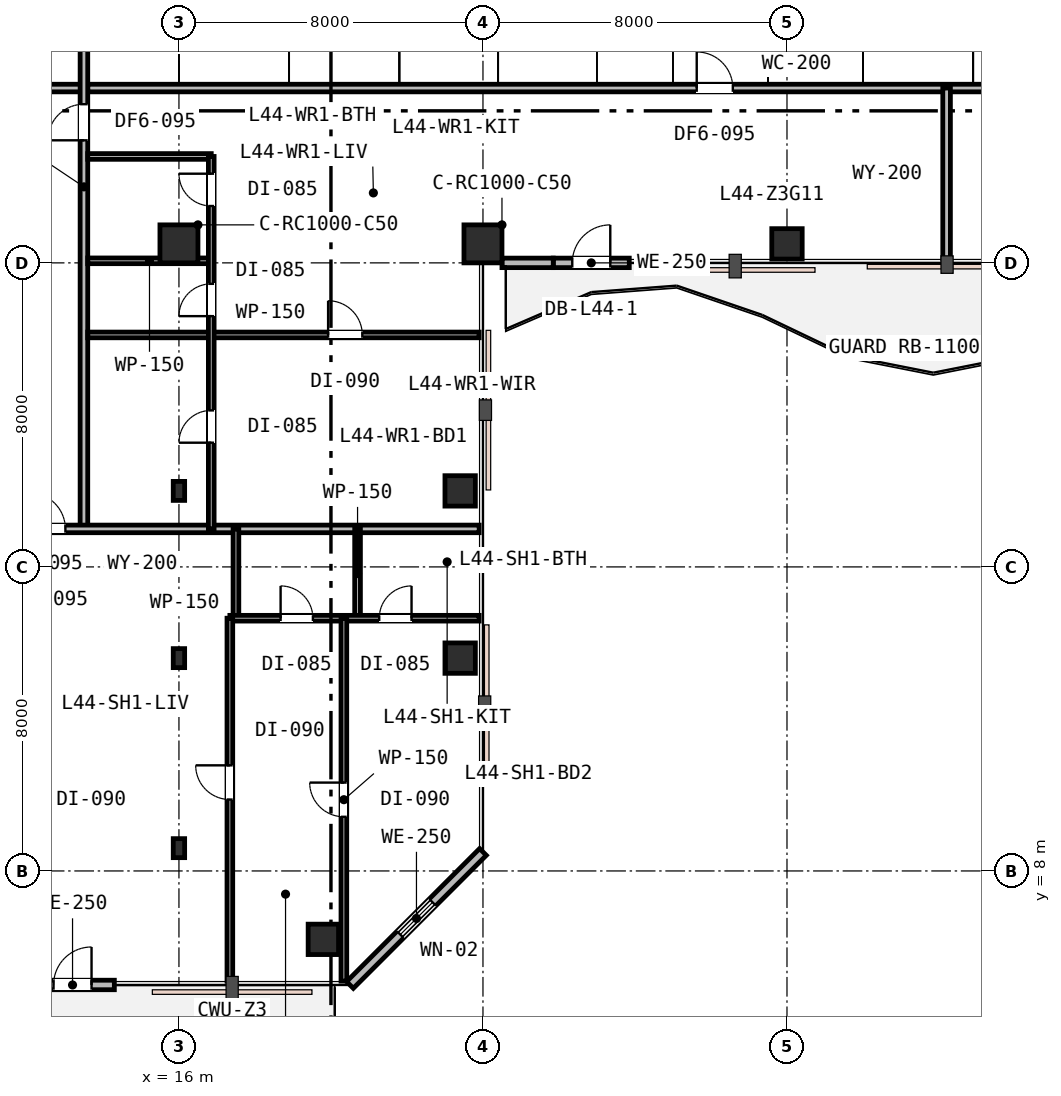
"""IFC4 building model, lengths in metres.
Left out: names, types, materials, properties, quantities, classifications, styles, units other than length and angle.
Written with IfcOpenShell. Run it as: python <this file> out.ifc"""

import sys

from ifc_helpers import new_model, si_unit, direction, frame, frame_2d, origin, origin_2d, place, context, subcontext, project, spatial, rectangle, i_section, extrude, element, fill, save


model = new_model("IFC4")
c1 = context("Model", 3, precision=1e-05, world=origin(), true_north=direction((0.0, 1.0)))
c2 = subcontext(c1, "Body", "Model", "MODEL_VIEW")
j1 = project(units=[si_unit("LENGTHUNIT", "METRE"), si_unit("PLANEANGLEUNIT", "RADIAN")], contexts=[c1])
p1 = place(None, origin())
s1 = spatial("IfcSite", under=j1, at=p1, CompositionType="ELEMENT")
p2 = place(p1, origin())
s2 = spatial("IfcBuilding", under=s1, at=p2, CompositionType="ELEMENT")
p3 = place(p2, frame((0.0, 0.0, 172.2)))
s3 = spatial("IfcBuildingStorey", under=s2, at=p3, CompositionType="ELEMENT", Elevation=172.2)
for number, where, z_axis, x_axis in (
    (1, (16.0, 24.5, 0.0), (0.0, 0.0, 1.0), (1.0, 0.0, 0.0)),
    (2, (24.0, 24.5, 0.0), (0.0, 0.0, 1.0), (1.0, 0.0, 0.0)),
):
    element("IfcColumn", number, at=place(p3, frame(where, z_axis=z_axis, x_axis=x_axis)), inside=s3, PredefinedType="COLUMN", context=c2, shape_type="SweptSolid", body=[
        extrude(rectangle(XDim=1.0, YDim=1.0, at=origin_2d()), origin(), (0.0, 0.0, 1.0), 3.6),
    ])
for number, where, z_axis, x_axis in (
    (3, (32.0, 24.5, 0.0), (0.0, 0.0, 1.0), (1.0, 0.0, 0.0)),
    (4, (19.8, 6.2, 0.0), (0.0, 0.0, 1.0), (1.0, 0.0, 0.0)),
    (5, (23.4, 13.6, 0.0), (0.0, 0.0, 1.0), (1.0, 0.0, 0.0)),
    (6, (23.4, 18.0, 0.0), (0.0, 0.0, 1.0), (1.0, 0.0, 0.0)),
):
    element("IfcColumn", number, at=place(p3, frame(where, z_axis=z_axis, x_axis=x_axis)), inside=s3, PredefinedType="COLUMN", context=c2, shape_type="SweptSolid", body=[
        extrude(rectangle(XDim=0.8, YDim=0.8, at=origin_2d()), origin(), (0.0, 0.0, 1.0), 3.6),
    ])
for number, where, z_axis, x_axis in (
    (7, (16.0, 8.6, 0.0), (0.0, 0.0, 1.0), (1.0, 0.0, 0.0)),
    (8, (16.0, 13.6, 0.0), (0.0, 0.0, 1.0), (1.0, 0.0, 0.0)),
    (9, (16.0, 18.0, 0.0), (0.0, 0.0, 1.0), (1.0, 0.0, 0.0)),
):
    element("IfcColumn", number, at=place(p3, frame(where, z_axis=z_axis, x_axis=x_axis)), inside=s3, PredefinedType="COLUMN", context=c2, shape_type="SweptSolid", body=[
        extrude(i_section(OverallWidth=0.3, OverallDepth=0.5, WebThickness=0.015, FlangeThickness=0.028, FilletRadius=0.027, at=origin_2d()), origin(), (0.0, 0.0, 1.0), 3.6),
    ])
p4 = place(p3, frame((12.1, 5.0, 0.0), z_axis=(0.0, 0.0, 1.0), x_axis=(1.0, 0.0, 0.0)))
e10 = element("IfcWall", 10, at=p4, inside=s3, PredefinedType="STANDARD", context=c2, shape_type="SweptSolid", body=[
    extrude(rectangle(XDim=2.2, YDim=0.25, at=frame_2d((1.1, 0.0))), origin(), (0.0, 0.0, 1.0), 3.33),
])
p5 = place(p4, frame((0.6, 0.0, 0.0)))
e11 = element("IfcOpeningElement", 11, at=p5, cuts=e10, PredefinedType="OPENING", context=c2, shape_type="SweptSolid", body=[
    extrude(rectangle(XDim=1.0, YDim=2.15, at=frame_2d((0.5, 1.075))), frame((0.0, 0.135, 0.0), z_axis=(0.0, -1.0, 0.0), x_axis=(1.0, 0.0, 0.0)), (0.0, 0.0, 1.0), 0.27),
])
p6 = place(p3, frame((20.5, 5.0, 0.0), z_axis=(0.0, 0.0, 1.0), x_axis=(0.707106781187, 0.707106781187, 0.0)))
e12 = element("IfcWall", 12, at=p6, inside=s3, PredefinedType="STANDARD", context=c2, shape_type="SweptSolid", body=[
    extrude(rectangle(XDim=4.95, YDim=0.25, at=frame_2d((2.475, 0.0))), origin(), (0.0, 0.0, 1.0), 3.33),
])
p7 = place(p6, frame((1.875, 0.0, 0.85)))
e13 = element("IfcOpeningElement", 13, at=p7, cuts=e12, PredefinedType="OPENING", context=c2, shape_type="SweptSolid", body=[
    extrude(rectangle(XDim=1.2, YDim=1.6, at=frame_2d((0.6, 0.8))), frame((0.0, 0.135, 0.0), z_axis=(0.0, -1.0, 0.0), x_axis=(1.0, 0.0, 0.0)), (0.0, 0.0, 1.0), 0.27),
])
p8 = place(p3, frame((25.85, 24.0, 0.0), z_axis=(0.0, 0.0, 1.0), x_axis=(1.0, 0.0, 0.0)))
e14 = element("IfcWall", 14, at=p8, inside=s3, PredefinedType="STANDARD", context=c2, shape_type="SweptSolid", body=[
    extrude(rectangle(XDim=2.0, YDim=0.25, at=frame_2d((1.0, 0.0))), origin(), (0.0, 0.0, 1.0), 3.02),
])
p9 = place(p8, frame((0.5, 0.0, 0.0)))
e15 = element("IfcOpeningElement", 15, at=p9, cuts=e14, PredefinedType="OPENING", context=c2, shape_type="SweptSolid", body=[
    extrude(rectangle(XDim=1.0, YDim=2.15, at=frame_2d((0.5, 1.075))), frame((0.0, 0.135, 0.0), z_axis=(0.0, -1.0, 0.0), x_axis=(1.0, 0.0, 0.0)), (0.0, 0.0, 1.0), 0.27),
])
p10 = place(p3, frame((24.5, 24.0, 0.0), z_axis=(0.0, 0.0, 1.0), x_axis=(1.0, 0.0, 0.0)))
e16 = element("IfcWall", 16, at=p10, inside=s3, PredefinedType="STANDARD", context=c2, shape_type="SweptSolid", body=[
    extrude(rectangle(XDim=1.35, YDim=0.25, at=frame_2d((0.675, 0.0))), origin(), (0.0, 0.0, 1.0), 3.02),
])
p11 = place(p3, frame((5.1, 28.6, 0.0), z_axis=(0.0, 0.0, 1.0), x_axis=(1.0, 0.0, 0.0)))
e17 = element("IfcWall", 17, at=p11, inside=s3, PredefinedType="PARTITIONING", context=c2, shape_type="SweptSolid", body=[
    extrude(rectangle(XDim=8.4, YDim=0.2, at=frame_2d((4.2, 0.0))), origin(), (0.0, 0.0, 1.0), 2.92),
])
p12 = place(p3, frame((13.6, 28.6, 0.0), z_axis=(0.0, 0.0, 1.0), x_axis=(1.0, 0.0, 0.0)))
e18 = element("IfcWall", 18, at=p12, inside=s3, PredefinedType="PARTITIONING", context=c2, shape_type="SweptSolid", body=[
    extrude(rectangle(XDim=37.3, YDim=0.2, at=frame_2d((18.65, 0.0))), origin(), (0.0, 0.0, 1.0), 2.92),
])
p13 = place(p12, frame((16.025, 0.0, 0.0)))
e19 = element("IfcOpeningElement", 19, at=p13, cuts=e18, PredefinedType="OPENING", context=c2, shape_type="SweptSolid", body=[
    extrude(rectangle(XDim=0.95, YDim=2.15, at=frame_2d((0.475, 1.075))), frame((0.0, 0.11, 0.0), z_axis=(0.0, -1.0, 0.0), x_axis=(1.0, 0.0, 0.0)), (0.0, 0.0, 1.0), 0.22),
])
p14 = place(p12, frame((25.925, 0.0, 0.0)))
e20 = element("IfcOpeningElement", 20, at=p14, cuts=e18, PredefinedType="OPENING", context=c2, shape_type="SweptSolid", body=[
    extrude(rectangle(XDim=0.95, YDim=2.15, at=frame_2d((0.475, 1.075))), frame((0.0, 0.11, 0.0), z_axis=(0.0, -1.0, 0.0), x_axis=(1.0, 0.0, 0.0)), (0.0, 0.0, 1.0), 0.22),
])
p15 = place(p3, frame((13.5, 17.0, 0.0), z_axis=(0.0, 0.0, 1.0), x_axis=(0.0, 1.0, 0.0)))
e21 = element("IfcWall", 21, at=p15, inside=s3, PredefinedType="PARTITIONING", context=c2, shape_type="SweptSolid", body=[
    extrude(rectangle(XDim=18.0, YDim=0.2, at=frame_2d((9.0, 0.0))), origin(), (0.0, 0.0, 1.0), 2.92),
])
p16 = place(p15, frame((15.425, 0.0, 0.0)))
e22 = element("IfcOpeningElement", 22, at=p16, cuts=e21, PredefinedType="OPENING", context=c2, shape_type="SweptSolid", body=[
    extrude(rectangle(XDim=0.95, YDim=2.15, at=frame_2d((0.475, 1.075))), frame((0.0, 0.11, 0.0), z_axis=(0.0, -1.0, 0.0), x_axis=(1.0, 0.0, 0.0)), (0.0, 0.0, 1.0), 0.22),
])
p17 = place(p15, frame((10.225, 0.0, 0.0)))
e23 = element("IfcOpeningElement", 23, at=p17, cuts=e21, PredefinedType="OPENING", context=c2, shape_type="SweptSolid", body=[
    extrude(rectangle(XDim=0.95, YDim=2.15, at=frame_2d((0.475, 1.075))), frame((0.0, 0.11, 0.0), z_axis=(0.0, -1.0, 0.0), x_axis=(1.0, 0.0, 0.0)), (0.0, 0.0, 1.0), 0.22),
])
p18 = place(p3, frame((36.2, 24.1, 0.0), z_axis=(0.0, 0.0, 1.0), x_axis=(0.0, 1.0, 0.0)))
e24 = element("IfcWall", 24, at=p18, inside=s3, PredefinedType="PARTITIONING", context=c2, shape_type="SweptSolid", body=[
    extrude(rectangle(XDim=4.5, YDim=0.2, at=frame_2d((2.25, 0.0))), origin(), (0.0, 0.0, 1.0), 3.02),
])
p19 = place(p3, frame((5.1, 17.0, 0.0), z_axis=(0.0, 0.0, 1.0), x_axis=(1.0, 0.0, 0.0)))
e25 = element("IfcWall", 25, at=p19, inside=s3, PredefinedType="PARTITIONING", context=c2, shape_type="SweptSolid", body=[
    extrude(rectangle(XDim=18.8, YDim=0.2, at=frame_2d((9.4, 0.0))), origin(), (0.0, 0.0, 1.0), 2.92),
])
p20 = place(p19, frame((6.962, 0.0, 0.0)))
e26 = element("IfcOpeningElement", 26, at=p20, cuts=e25, PredefinedType="OPENING", context=c2, shape_type="SweptSolid", body=[
    extrude(rectangle(XDim=0.95, YDim=2.15, at=frame_2d((0.475, 1.075))), frame((0.0, 0.11, 0.0), z_axis=(0.0, -1.0, 0.0), x_axis=(1.0, 0.0, 0.0)), (0.0, 0.0, 1.0), 0.22),
])
p21 = place(p3, frame((13.6, 22.104, 0.0), z_axis=(0.0, 0.0, 1.0), x_axis=(1.0, 0.0, 0.0)))
e27 = element("IfcWall", 27, at=p21, inside=s3, PredefinedType="PARTITIONING", context=c2, shape_type="SweptSolid", body=[
    extrude(rectangle(XDim=10.3, YDim=0.15, at=frame_2d((5.15, 0.0))), origin(), (0.0, 0.0, 1.0), 2.92),
])
p22 = place(p21, frame((6.325, 0.0, 0.0)))
e28 = element("IfcOpeningElement", 28, at=p22, cuts=e27, PredefinedType="OPENING", context=c2, shape_type="SweptSolid", body=[
    extrude(rectangle(XDim=0.9, YDim=2.15, at=frame_2d((0.45, 1.075))), frame((0.0, 0.085, 0.0), z_axis=(0.0, -1.0, 0.0), x_axis=(1.0, 0.0, 0.0)), (0.0, 0.0, 1.0), 0.17),
])
for number, where, z_axis, x_axis in (
    (29, (13.6, 24.054, 0.0), (0.0, 0.0, 1.0), (1.0, 0.0, 0.0)),
    (30, (13.6, 26.8, 0.0), (0.0, 0.0, 1.0), (1.0, 0.0, 0.0)),
):
    element("IfcWall", number, at=place(p3, frame(where, z_axis=z_axis, x_axis=x_axis)), inside=s3, PredefinedType="PARTITIONING", context=c2, shape_type="SweptSolid", body=[
        extrude(rectangle(XDim=3.25, YDim=0.15, at=frame_2d((1.625, 0.0))), origin(), (0.0, 0.0, 1.0), 2.92),
    ])
p23 = place(p3, frame((16.85, 17.0, 0.0), z_axis=(0.0, 0.0, 1.0), x_axis=(0.0, 1.0, 0.0)))
e31 = element("IfcWall", 31, at=p23, inside=s3, PredefinedType="PARTITIONING", context=c2, shape_type="SweptSolid", body=[
    extrude(rectangle(XDim=9.8, YDim=0.15, at=frame_2d((4.9, 0.0))), origin(), (0.0, 0.0, 1.0), 2.92),
])
p24 = place(p23, frame((5.598, 0.0, 0.0)))
e32 = element("IfcOpeningElement", 32, at=p24, cuts=e31, PredefinedType="OPENING", context=c2, shape_type="SweptSolid", body=[
    extrude(rectangle(XDim=0.85, YDim=2.15, at=frame_2d((0.425, 1.075))), frame((0.0, 0.085, 0.0), z_axis=(0.0, -1.0, 0.0), x_axis=(1.0, 0.0, 0.0)), (0.0, 0.0, 1.0), 0.17),
])
p25 = place(p23, frame((8.496, 0.0, 0.0)))
e33 = element("IfcOpeningElement", 33, at=p25, cuts=e31, PredefinedType="OPENING", context=c2, shape_type="SweptSolid", body=[
    extrude(rectangle(XDim=0.85, YDim=2.15, at=frame_2d((0.425, 1.075))), frame((0.0, 0.085, 0.0), z_axis=(0.0, -1.0, 0.0), x_axis=(1.0, 0.0, 0.0)), (0.0, 0.0, 1.0), 0.17),
])
p26 = place(p23, frame((2.268, 0.0, 0.0)))
e34 = element("IfcOpeningElement", 34, at=p26, cuts=e31, PredefinedType="OPENING", context=c2, shape_type="SweptSolid", body=[
    extrude(rectangle(XDim=0.85, YDim=2.15, at=frame_2d((0.425, 1.075))), frame((0.0, 0.085, 0.0), z_axis=(0.0, -1.0, 0.0), x_axis=(1.0, 0.0, 0.0)), (0.0, 0.0, 1.0), 0.17),
])
p27 = place(p3, frame((17.5, 14.65, 0.0), z_axis=(0.0, 0.0, 1.0), x_axis=(0.0, 1.0, 0.0)))
e35 = element("IfcWall", 35, at=p27, inside=s3, PredefinedType="PARTITIONING", context=c2, shape_type="SweptSolid", body=[
    extrude(rectangle(XDim=2.35, YDim=0.15, at=frame_2d((1.175, 0.0))), origin(), (0.0, 0.0, 1.0), 3.33),
])
p28 = place(p3, frame((20.7, 14.65, 0.0), z_axis=(0.0, 0.0, 1.0), x_axis=(0.0, 1.0, 0.0)))
e36 = element("IfcWall", 36, at=p28, inside=s3, PredefinedType="PARTITIONING", context=c2, shape_type="SweptSolid", body=[
    extrude(rectangle(XDim=2.35, YDim=0.15, at=frame_2d((1.175, 0.0))), origin(), (0.0, 0.0, 1.0), 3.07),
])
p29 = place(p3, frame((17.34, 14.65, 0.0), z_axis=(0.0, 0.0, 1.0), x_axis=(1.0, 0.0, 0.0)))
e37 = element("IfcWall", 37, at=p29, inside=s3, PredefinedType="PARTITIONING", context=c2, shape_type="SweptSolid", body=[
    extrude(rectangle(XDim=6.56, YDim=0.15, at=frame_2d((3.28, 0.0))), origin(), (0.0, 0.0, 1.0), 3.02),
])
p30 = place(p29, frame((1.335, 0.0, 0.0)))
e38 = element("IfcOpeningElement", 38, at=p30, cuts=e37, PredefinedType="OPENING", context=c2, shape_type="SweptSolid", body=[
    extrude(rectangle(XDim=0.85, YDim=2.15, at=frame_2d((0.425, 1.075))), frame((0.0, 0.085, 0.0), z_axis=(0.0, -1.0, 0.0), x_axis=(1.0, 0.0, 0.0)), (0.0, 0.0, 1.0), 0.17),
])
p31 = place(p29, frame((3.93, 0.0, 0.0)))
e39 = element("IfcOpeningElement", 39, at=p31, cuts=e37, PredefinedType="OPENING", context=c2, shape_type="SweptSolid", body=[
    extrude(rectangle(XDim=0.85, YDim=2.15, at=frame_2d((0.425, 1.075))), frame((0.0, 0.085, 0.0), z_axis=(0.0, -1.0, 0.0), x_axis=(1.0, 0.0, 0.0)), (0.0, 0.0, 1.0), 0.17),
])
p32 = place(p3, frame((20.34, 5.1, 0.0), z_axis=(0.0, 0.0, 1.0), x_axis=(0.0, 1.0, 0.0)))
e40 = element("IfcWall", 40, at=p32, inside=s3, PredefinedType="PARTITIONING", context=c2, shape_type="SweptSolid", body=[
    extrude(rectangle(XDim=9.55, YDim=0.15, at=frame_2d((4.775, 0.0))), origin(), (0.0, 0.0, 1.0), 2.92),
])
p33 = place(p32, frame((4.325, 0.0, 0.0)))
e41 = element("IfcOpeningElement", 41, at=p33, cuts=e40, PredefinedType="OPENING", context=c2, shape_type="SweptSolid", body=[
    extrude(rectangle(XDim=0.9, YDim=2.15, at=frame_2d((0.45, 1.075))), frame((0.0, 0.085, 0.0), z_axis=(0.0, -1.0, 0.0), x_axis=(1.0, 0.0, 0.0)), (0.0, 0.0, 1.0), 0.17),
])
p34 = place(p3, frame((17.34, 5.1, 0.0), z_axis=(0.0, 0.0, 1.0), x_axis=(0.0, 1.0, 0.0)))
e42 = element("IfcWall", 42, at=p34, inside=s3, PredefinedType="PARTITIONING", context=c2, shape_type="SweptSolid", body=[
    extrude(rectangle(XDim=9.55, YDim=0.15, at=frame_2d((4.775, 0.0))), origin(), (0.0, 0.0, 1.0), 2.92),
])
p35 = place(p34, frame((4.779, 0.0, 0.0)))
e43 = element("IfcOpeningElement", 43, at=p35, cuts=e42, PredefinedType="OPENING", context=c2, shape_type="SweptSolid", body=[
    extrude(rectangle(XDim=0.9, YDim=2.15, at=frame_2d((0.45, 1.075))), frame((0.0, 0.085, 0.0), z_axis=(0.0, -1.0, 0.0), x_axis=(1.0, 0.0, 0.0)), (0.0, 0.0, 1.0), 0.17),
])
p36 = place(p5, origin())
e44 = element("IfcDoor", 44, at=p36, inside=s3, OperationType="SINGLE_SWING_RIGHT", PredefinedType="DOOR", context=c2, shape_type="SweptSolid", body=[
    extrude(rectangle(XDim=1.0, YDim=2.15, at=frame_2d((0.5, 1.075))), frame((0.0, 0.025, 0.0), z_axis=(0.0, -1.0, 0.0), x_axis=(1.0, 0.0, 0.0)), (0.0, 0.0, 1.0), 0.05),
])
fill(e11, e44)
p37 = place(p7, origin())
e45 = element("IfcWindow", 45, at=p37, inside=s3, PartitioningType="SINGLE_PANEL", PredefinedType="WINDOW", context=c2, shape_type="SweptSolid", body=[
    extrude(rectangle(XDim=1.2, YDim=1.6, at=frame_2d((0.6, 0.8))), frame((0.0, 0.03, 0.0), z_axis=(0.0, -1.0, 0.0), x_axis=(1.0, 0.0, 0.0)), (0.0, 0.0, 1.0), 0.06),
])
fill(e13, e45)
p38 = place(p9, origin())
e46 = element("IfcDoor", 46, at=p38, inside=s3, OperationType="SINGLE_SWING_RIGHT", PredefinedType="DOOR", context=c2, shape_type="SweptSolid", body=[
    extrude(rectangle(XDim=1.0, YDim=2.15, at=frame_2d((0.5, 1.075))), frame((0.0, 0.025, 0.0), z_axis=(0.0, -1.0, 0.0), x_axis=(1.0, 0.0, 0.0)), (0.0, 0.0, 1.0), 0.05),
])
fill(e15, e46)
p39 = place(p13, origin())
e47 = element("IfcDoor", 47, at=p39, inside=s3, OperationType="SINGLE_SWING_LEFT", PredefinedType="DOOR", context=c2, shape_type="SweptSolid", body=[
    extrude(rectangle(XDim=0.95, YDim=2.15, at=frame_2d((0.475, 1.075))), frame((0.0, 0.025, 0.0), z_axis=(0.0, -1.0, 0.0), x_axis=(1.0, 0.0, 0.0)), (0.0, 0.0, 1.0), 0.05),
])
fill(e19, e47)
p40 = place(p17, origin())
e48 = element("IfcDoor", 48, at=p40, inside=s3, OperationType="SINGLE_SWING_LEFT", PredefinedType="DOOR", context=c2, shape_type="SweptSolid", body=[
    extrude(rectangle(XDim=0.95, YDim=2.15, at=frame_2d((0.475, 1.075))), frame((0.0, 0.025, 0.0), z_axis=(0.0, -1.0, 0.0), x_axis=(1.0, 0.0, 0.0)), (0.0, 0.0, 1.0), 0.05),
])
fill(e23, e48)
p41 = place(p24, origin())
e49 = element("IfcDoor", 49, at=p41, inside=s3, OperationType="SINGLE_SWING_LEFT", PredefinedType="DOOR", context=c2, shape_type="SweptSolid", body=[
    extrude(rectangle(XDim=0.85, YDim=2.15, at=frame_2d((0.425, 1.075))), frame((0.0, 0.025, 0.0), z_axis=(0.0, -1.0, 0.0), x_axis=(1.0, 0.0, 0.0)), (0.0, 0.0, 1.0), 0.05),
])
fill(e32, e49)
p42 = place(p25, origin())
e50 = element("IfcDoor", 50, at=p42, inside=s3, OperationType="SINGLE_SWING_RIGHT", PredefinedType="DOOR", context=c2, shape_type="SweptSolid", body=[
    extrude(rectangle(XDim=0.85, YDim=2.15, at=frame_2d((0.425, 1.075))), frame((0.0, 0.025, 0.0), z_axis=(0.0, -1.0, 0.0), x_axis=(1.0, 0.0, 0.0)), (0.0, 0.0, 1.0), 0.05),
])
fill(e33, e50)
p43 = place(p26, origin())
e51 = element("IfcDoor", 51, at=p43, inside=s3, OperationType="SINGLE_SWING_LEFT", PredefinedType="DOOR", context=c2, shape_type="SweptSolid", body=[
    extrude(rectangle(XDim=0.85, YDim=2.15, at=frame_2d((0.425, 1.075))), frame((0.0, 0.025, 0.0), z_axis=(0.0, -1.0, 0.0), x_axis=(1.0, 0.0, 0.0)), (0.0, 0.0, 1.0), 0.05),
])
fill(e34, e51)
p44 = place(p22, origin())
e52 = element("IfcDoor", 52, at=p44, inside=s3, OperationType="SINGLE_SWING_LEFT", PredefinedType="DOOR", context=c2, shape_type="SweptSolid", body=[
    extrude(rectangle(XDim=0.9, YDim=2.15, at=frame_2d((0.45, 1.075))), frame((0.0, 0.025, 0.0), z_axis=(0.0, -1.0, 0.0), x_axis=(1.0, 0.0, 0.0)), (0.0, 0.0, 1.0), 0.05),
])
fill(e28, e52)
p45 = place(p20, origin())
e53 = element("IfcDoor", 53, at=p45, inside=s3, OperationType="SINGLE_SWING_LEFT", PredefinedType="DOOR", context=c2, shape_type="SweptSolid", body=[
    extrude(rectangle(XDim=0.95, YDim=2.15, at=frame_2d((0.475, 1.075))), frame((0.0, 0.025, 0.0), z_axis=(0.0, -1.0, 0.0), x_axis=(1.0, 0.0, 0.0)), (0.0, 0.0, 1.0), 0.05),
])
fill(e26, e53)
p46 = place(p30, origin())
e54 = element("IfcDoor", 54, at=p46, inside=s3, OperationType="SINGLE_SWING_LEFT", PredefinedType="DOOR", context=c2, shape_type="SweptSolid", body=[
    extrude(rectangle(XDim=0.85, YDim=2.15, at=frame_2d((0.425, 1.075))), frame((0.0, 0.025, 0.0), z_axis=(0.0, -1.0, 0.0), x_axis=(1.0, 0.0, 0.0)), (0.0, 0.0, 1.0), 0.05),
])
fill(e38, e54)
p47 = place(p31, origin())
e55 = element("IfcDoor", 55, at=p47, inside=s3, OperationType="SINGLE_SWING_RIGHT", PredefinedType="DOOR", context=c2, shape_type="SweptSolid", body=[
    extrude(rectangle(XDim=0.85, YDim=2.15, at=frame_2d((0.425, 1.075))), frame((0.0, 0.025, 0.0), z_axis=(0.0, -1.0, 0.0), x_axis=(1.0, 0.0, 0.0)), (0.0, 0.0, 1.0), 0.05),
])
fill(e39, e55)
p48 = place(p33, origin())
e56 = element("IfcDoor", 56, at=p48, inside=s3, OperationType="SINGLE_SWING_RIGHT", PredefinedType="DOOR", context=c2, shape_type="SweptSolid", body=[
    extrude(rectangle(XDim=0.9, YDim=2.15, at=frame_2d((0.45, 1.075))), frame((0.0, 0.025, 0.0), z_axis=(0.0, -1.0, 0.0), x_axis=(1.0, 0.0, 0.0)), (0.0, 0.0, 1.0), 0.05),
])
fill(e41, e56)
p49 = place(p35, origin())
e57 = element("IfcDoor", 57, at=p49, inside=s3, OperationType="SINGLE_SWING_RIGHT", PredefinedType="DOOR", context=c2, shape_type="SweptSolid", body=[
    extrude(rectangle(XDim=0.9, YDim=2.15, at=frame_2d((0.45, 1.075))), frame((0.0, 0.025, 0.0), z_axis=(0.0, -1.0, 0.0), x_axis=(1.0, 0.0, 0.0)), (0.0, 0.0, 1.0), 0.05),
])
fill(e43, e57)
save(model, sys.argv[1])
